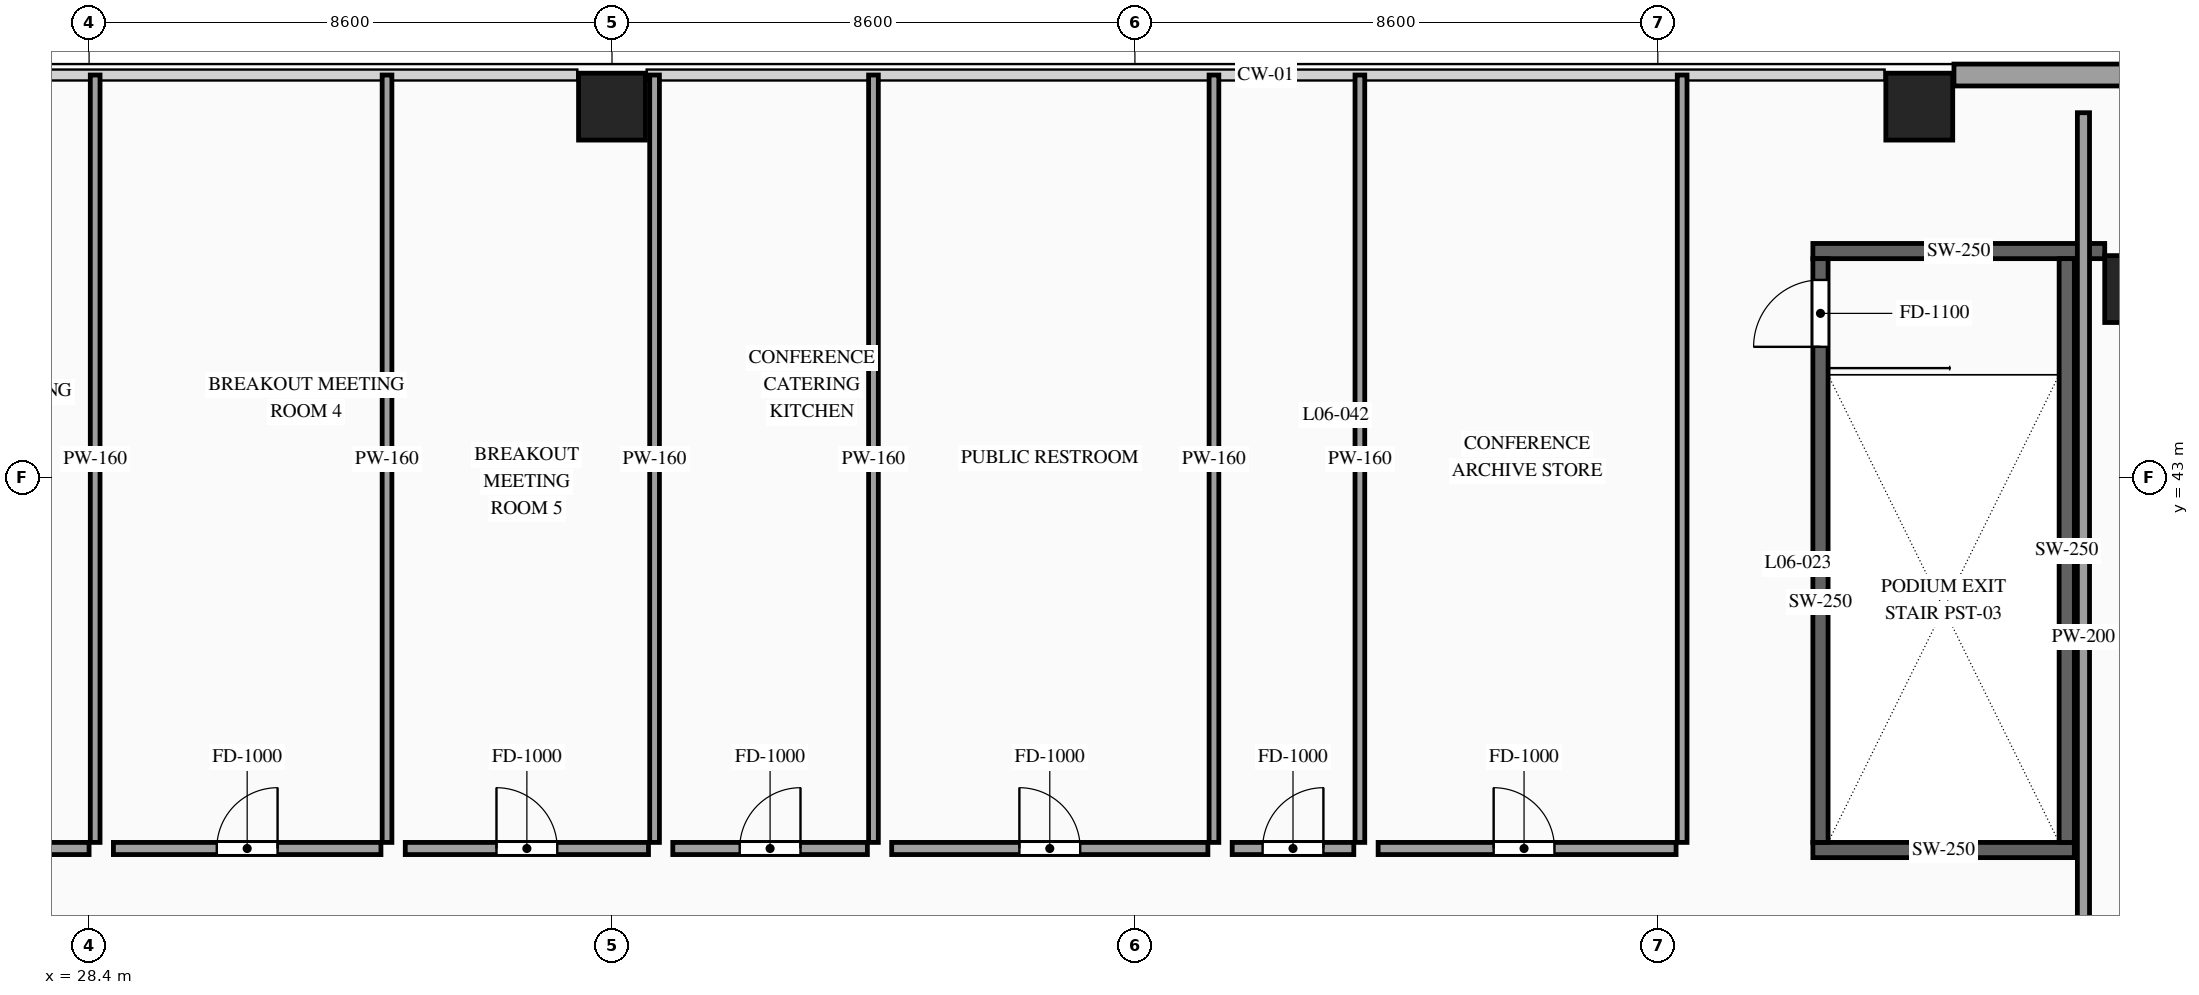
"""IFC4 building model, lengths in metres.
Left out: names, types, materials, properties, quantities, classifications, styles, units other than length and angle.
Written with IfcOpenShell. Run it as: python <this file> out.ifc"""

import sys

from ifc_helpers import new_model, si_unit, direction, frame, frame_2d, origin, origin_2d, place, context, subcontext, project, spatial, rectangle, extrude, source, transform, mapped, element, fill, save


model = new_model("IFC4")
c1 = context("Model", 3, precision=1e-05, world=origin(), true_north=direction((0.0, 1.0)))
c2 = subcontext(c1, "Body", "Model", "MODEL_VIEW")
j1 = project(units=[si_unit("LENGTHUNIT", "METRE"), si_unit("PLANEANGLEUNIT", "RADIAN")], contexts=[c1])
p1 = place(None, origin())
s1 = spatial("IfcSite", under=j1, at=p1, CompositionType="ELEMENT")
p2 = place(p1, origin())
s2 = spatial("IfcBuilding", under=s1, at=p2, CompositionType="ELEMENT")
p3 = place(p2, frame((0.0, 0.0, 25.8)))
s3 = spatial("IfcBuildingStorey", under=s2, at=p3, CompositionType="ELEMENT", Elevation=25.8)
m1 = source(origin(), c2, "Body", "SweptSolid", [
    extrude(rectangle(XDim=1.1, YDim=1.1, at=origin_2d()), origin(), (0.0, 0.0, 1.0), 4.8),
])
for number, where, z_axis, x_axis in (
    (1, (62.1, 46.1, 0.0), (0.0, 0.0, 1.0), (1.0, 0.0, 0.0)),
    (2, (37.0, 49.1, 0.0), (0.0, 0.0, 1.0), (1.0, 0.0, 0.0)),
    (3, (58.5, 49.1, 0.0), (0.0, 0.0, 1.0), (1.0, 0.0, 0.0)),
):
    element("IfcColumn", number, at=place(p3, frame(where, z_axis=z_axis, x_axis=x_axis)), inside=s3, PredefinedType="COLUMN", context=c2, shape_type="MappedRepresentation", body=[
        mapped(m1, transform((0.0, 0.0, 0.0), scale=1.0)),
    ])
p4 = place(p3, frame((59.07, 49.62, 0.0), z_axis=(0.0, 0.0, 1.0), x_axis=(1.0, 0.0, 0.0)))
e4 = element("IfcWall", 4, at=p4, inside=s3, PredefinedType="SOLIDWALL", context=c2, shape_type="SweptSolid", body=[
    extrude(rectangle(XDim=12.93, YDim=0.36, at=frame_2d((6.465, 0.0))), origin(), (0.0, 0.0, 1.0), 4.5),
])
p5 = place(p4, frame((6.03, 0.0, 0.9)))
e5 = element("IfcOpeningElement", 5, at=p5, cuts=e4, PredefinedType="OPENING", context=c2, shape_type="SweptSolid", body=[
    extrude(rectangle(XDim=1.8, YDim=2.2, at=frame_2d((0.9, 1.1))), frame((0.0, 0.195, 0.0), z_axis=(0.0, -1.0, 0.0), x_axis=(1.0, 0.0, 0.0)), (0.0, 0.0, 1.0), 0.39),
])
m2 = source(origin(), c2, "Body", "SweptSolid", [
    extrude(rectangle(XDim=4.3, YDim=0.25, at=frame_2d((2.15, 0.0))), origin(), (0.0, 0.0, 1.0), 4.5),
])
p6 = place(p3, frame((56.75, 36.875, 0.0), z_axis=(0.0, 0.0, 1.0), x_axis=(1.0, 0.0, 0.0)))
e6 = element("IfcWall", 6, at=p6, inside=s3, PredefinedType="SOLIDWALL", context=c2, shape_type="MappedRepresentation", body=[
    mapped(m2, transform((0.0, 0.0, 0.0), scale=1.0)),
])
m3 = source(origin(), c2, "Body", "SweptSolid", [
    extrude(rectangle(XDim=4.8, YDim=0.25, at=frame_2d((2.4, 0.0))), origin(), (0.0, 0.0, 1.0), 4.5),
])
p7 = place(p3, frame((56.75, 46.725, 0.0), z_axis=(0.0, 0.0, 1.0), x_axis=(1.0, 0.0, 0.0)))
e7 = element("IfcWall", 7, at=p7, inside=s3, PredefinedType="SOLIDWALL", context=c2, shape_type="MappedRepresentation", body=[
    mapped(m3, transform((0.0, 0.0, 0.0), scale=1.0)),
])
p8 = place(p3, frame((56.875, 37.0, 0.0), z_axis=(0.0, 0.0, 1.0), x_axis=(0.0, 1.0, 0.0)))
e8 = element("IfcWall", 8, at=p8, inside=s3, PredefinedType="SOLIDWALL", context=c2, shape_type="SweptSolid", body=[
    extrude(rectangle(XDim=9.6, YDim=0.25, at=frame_2d((4.8, 0.0))), origin(), (0.0, 0.0, 1.0), 4.5),
])
p9 = place(p8, frame((8.15, 0.0, 0.0)))
e9 = element("IfcOpeningElement", 9, at=p9, cuts=e8, PredefinedType="OPENING", context=c2, shape_type="SweptSolid", body=[
    extrude(rectangle(XDim=1.1, YDim=2.2, at=frame_2d((0.55, 1.1))), frame((0.0, 0.14, 0.0), z_axis=(0.0, -1.0, 0.0), x_axis=(1.0, 0.0, 0.0)), (0.0, 0.0, 1.0), 0.28),
])
m4 = source(origin(), c2, "Body", "SweptSolid", [
    extrude(rectangle(XDim=9.6, YDim=0.25, at=frame_2d((4.8, 0.0))), origin(), (0.0, 0.0, 1.0), 4.5),
])
p10 = place(p3, frame((60.925, 37.0, 0.0), z_axis=(0.0, 0.0, 1.0), x_axis=(0.0, 1.0, 0.0)))
e10 = element("IfcWall", 10, at=p10, inside=s3, PredefinedType="SOLIDWALL", context=c2, shape_type="MappedRepresentation", body=[
    mapped(m4, transform((0.0, 0.0, 0.0), scale=1.0)),
])
p11 = place(p3, frame((61.2, 24.8, 0.0), z_axis=(0.0, 0.0, 1.0), x_axis=(0.0, 1.0, 0.0)))
e11 = element("IfcWall", 11, at=p11, inside=s3, PredefinedType="PARTITIONING", context=c2, shape_type="SweptSolid", body=[
    extrude(rectangle(XDim=24.2, YDim=0.2, at=frame_2d((12.1, 0.0))), origin(), (0.0, 0.0, 1.0), 4.5),
])
p12 = place(p11, frame((5.7, 0.0, 0.0)))
e12 = element("IfcOpeningElement", 12, at=p12, cuts=e11, PredefinedType="OPENING", context=c2, shape_type="SweptSolid", body=[
    extrude(rectangle(XDim=1.0, YDim=2.2, at=frame_2d((0.5, 1.1))), frame((0.0, 0.115, 0.0), z_axis=(0.0, -1.0, 0.0), x_axis=(1.0, 0.0, 0.0)), (0.0, 0.0, 1.0), 0.23),
])
p13 = place(p3, frame((23.6, 36.9, 0.0), z_axis=(0.0, 0.0, 1.0), x_axis=(1.0, 0.0, 0.0)))
e13 = element("IfcWall", 13, at=p13, inside=s3, PredefinedType="PARTITIONING", context=c2, shape_type="SweptSolid", body=[
    extrude(rectangle(XDim=4.8, YDim=0.2, at=frame_2d((2.4, 0.0))), origin(), (0.0, 0.0, 1.0), 4.5),
])
p14 = place(p13, frame((1.9, 0.0, 0.0)))
e14 = element("IfcOpeningElement", 14, at=p14, cuts=e13, PredefinedType="OPENING", context=c2, shape_type="SweptSolid", body=[
    extrude(rectangle(XDim=1.0, YDim=2.2, at=frame_2d((0.5, 1.1))), frame((0.0, 0.115, 0.0), z_axis=(0.0, -1.0, 0.0), x_axis=(1.0, 0.0, 0.0)), (0.0, 0.0, 1.0), 0.23),
])
m5 = source(origin(), c2, "Body", "SweptSolid", [
    extrude(rectangle(XDim=12.62, YDim=0.16, at=frame_2d((6.31, 0.0))), origin(), (0.0, 0.0, 1.0), 4.5),
])
p15 = place(p3, frame((28.5, 37.0, 0.0), z_axis=(0.0, 0.0, 1.0), x_axis=(0.0, 1.0, 0.0)))
e15 = element("IfcWall", 15, at=p15, inside=s3, PredefinedType="PARTITIONING", context=c2, shape_type="MappedRepresentation", body=[
    mapped(m5, transform((0.0, 0.0, 0.0), scale=1.0)),
])
p16 = place(p3, frame((28.8, 36.9, 0.0), z_axis=(0.0, 0.0, 1.0), x_axis=(1.0, 0.0, 0.0)))
e16 = element("IfcWall", 16, at=p16, inside=s3, PredefinedType="PARTITIONING", context=c2, shape_type="SweptSolid", body=[
    extrude(rectangle(XDim=4.4, YDim=0.2, at=frame_2d((2.2, 0.0))), origin(), (0.0, 0.0, 1.0), 4.5),
])
p17 = place(p16, frame((1.7, 0.0, 0.0)))
e17 = element("IfcOpeningElement", 17, at=p17, cuts=e16, PredefinedType="OPENING", context=c2, shape_type="SweptSolid", body=[
    extrude(rectangle(XDim=1.0, YDim=2.2, at=frame_2d((0.5, 1.1))), frame((0.0, 0.115, 0.0), z_axis=(0.0, -1.0, 0.0), x_axis=(1.0, 0.0, 0.0)), (0.0, 0.0, 1.0), 0.23),
])
p18 = place(p3, frame((33.3, 37.0, 0.0), z_axis=(0.0, 0.0, 1.0), x_axis=(0.0, 1.0, 0.0)))
e18 = element("IfcWall", 18, at=p18, inside=s3, PredefinedType="PARTITIONING", context=c2, shape_type="MappedRepresentation", body=[
    mapped(m5, transform((0.0, 0.0, 0.0), scale=1.0)),
])
p19 = place(p3, frame((33.6, 36.9, 0.0), z_axis=(0.0, 0.0, 1.0), x_axis=(1.0, 0.0, 0.0)))
e19 = element("IfcWall", 19, at=p19, inside=s3, PredefinedType="PARTITIONING", context=c2, shape_type="SweptSolid", body=[
    extrude(rectangle(XDim=4.0, YDim=0.2, at=frame_2d((2.0, 0.0))), origin(), (0.0, 0.0, 1.0), 4.5),
])
p20 = place(p19, frame((1.5, 0.0, 0.0)))
e20 = element("IfcOpeningElement", 20, at=p20, cuts=e19, PredefinedType="OPENING", context=c2, shape_type="SweptSolid", body=[
    extrude(rectangle(XDim=1.0, YDim=2.2, at=frame_2d((0.5, 1.1))), frame((0.0, 0.115, 0.0), z_axis=(0.0, -1.0, 0.0), x_axis=(1.0, 0.0, 0.0)), (0.0, 0.0, 1.0), 0.23),
])
p21 = place(p3, frame((37.7, 37.0, 0.0), z_axis=(0.0, 0.0, 1.0), x_axis=(0.0, 1.0, 0.0)))
e21 = element("IfcWall", 21, at=p21, inside=s3, PredefinedType="PARTITIONING", context=c2, shape_type="MappedRepresentation", body=[
    mapped(m5, transform((0.0, 0.0, 0.0), scale=1.0)),
])
p22 = place(p3, frame((38.0, 36.9, 0.0), z_axis=(0.0, 0.0, 1.0), x_axis=(1.0, 0.0, 0.0)))
e22 = element("IfcWall", 22, at=p22, inside=s3, PredefinedType="PARTITIONING", context=c2, shape_type="SweptSolid", body=[
    extrude(rectangle(XDim=3.2, YDim=0.2, at=frame_2d((1.6, 0.0))), origin(), (0.0, 0.0, 1.0), 4.5),
])
p23 = place(p22, frame((1.1, 0.0, 0.0)))
e23 = element("IfcOpeningElement", 23, at=p23, cuts=e22, PredefinedType="OPENING", context=c2, shape_type="SweptSolid", body=[
    extrude(rectangle(XDim=1.0, YDim=2.2, at=frame_2d((0.5, 1.1))), frame((0.0, 0.115, 0.0), z_axis=(0.0, -1.0, 0.0), x_axis=(1.0, 0.0, 0.0)), (0.0, 0.0, 1.0), 0.23),
])
p24 = place(p3, frame((41.3, 37.0, 0.0), z_axis=(0.0, 0.0, 1.0), x_axis=(0.0, 1.0, 0.0)))
e24 = element("IfcWall", 24, at=p24, inside=s3, PredefinedType="PARTITIONING", context=c2, shape_type="MappedRepresentation", body=[
    mapped(m5, transform((0.0, 0.0, 0.0), scale=1.0)),
])
p25 = place(p3, frame((41.6, 36.9, 0.0), z_axis=(0.0, 0.0, 1.0), x_axis=(1.0, 0.0, 0.0)))
e25 = element("IfcWall", 25, at=p25, inside=s3, PredefinedType="PARTITIONING", context=c2, shape_type="SweptSolid", body=[
    extrude(rectangle(XDim=5.2, YDim=0.2, at=frame_2d((2.6, 0.0))), origin(), (0.0, 0.0, 1.0), 4.5),
])
p26 = place(p25, frame((2.1, 0.0, 0.0)))
e26 = element("IfcOpeningElement", 26, at=p26, cuts=e25, PredefinedType="OPENING", context=c2, shape_type="SweptSolid", body=[
    extrude(rectangle(XDim=1.0, YDim=2.2, at=frame_2d((0.5, 1.1))), frame((0.0, 0.115, 0.0), z_axis=(0.0, -1.0, 0.0), x_axis=(1.0, 0.0, 0.0)), (0.0, 0.0, 1.0), 0.23),
])
p27 = place(p3, frame((46.9, 37.0, 0.0), z_axis=(0.0, 0.0, 1.0), x_axis=(0.0, 1.0, 0.0)))
e27 = element("IfcWall", 27, at=p27, inside=s3, PredefinedType="PARTITIONING", context=c2, shape_type="MappedRepresentation", body=[
    mapped(m5, transform((0.0, 0.0, 0.0), scale=1.0)),
])
p28 = place(p3, frame((47.2, 36.9, 0.0), z_axis=(0.0, 0.0, 1.0), x_axis=(1.0, 0.0, 0.0)))
e28 = element("IfcWall", 28, at=p28, inside=s3, PredefinedType="PARTITIONING", context=c2, shape_type="SweptSolid", body=[
    extrude(rectangle(XDim=2.0, YDim=0.2, at=frame_2d((1.0, 0.0))), origin(), (0.0, 0.0, 1.0), 4.5),
])
p29 = place(p28, frame((0.5, 0.0, 0.0)))
e29 = element("IfcOpeningElement", 29, at=p29, cuts=e28, PredefinedType="OPENING", context=c2, shape_type="SweptSolid", body=[
    extrude(rectangle(XDim=1.0, YDim=2.2, at=frame_2d((0.5, 1.1))), frame((0.0, 0.115, 0.0), z_axis=(0.0, -1.0, 0.0), x_axis=(1.0, 0.0, 0.0)), (0.0, 0.0, 1.0), 0.23),
])
p30 = place(p3, frame((49.3, 37.0, 0.0), z_axis=(0.0, 0.0, 1.0), x_axis=(0.0, 1.0, 0.0)))
e30 = element("IfcWall", 30, at=p30, inside=s3, PredefinedType="PARTITIONING", context=c2, shape_type="MappedRepresentation", body=[
    mapped(m5, transform((0.0, 0.0, 0.0), scale=1.0)),
])
p31 = place(p3, frame((49.6, 36.9, 0.0), z_axis=(0.0, 0.0, 1.0), x_axis=(1.0, 0.0, 0.0)))
e31 = element("IfcWall", 31, at=p31, inside=s3, PredefinedType="PARTITIONING", context=c2, shape_type="SweptSolid", body=[
    extrude(rectangle(XDim=4.9, YDim=0.2, at=frame_2d((2.45, 0.0))), origin(), (0.0, 0.0, 1.0), 4.5),
])
p32 = place(p31, frame((1.9, 0.0, 0.0)))
e32 = element("IfcOpeningElement", 32, at=p32, cuts=e31, PredefinedType="OPENING", context=c2, shape_type="SweptSolid", body=[
    extrude(rectangle(XDim=1.0, YDim=2.2, at=frame_2d((0.5, 1.1))), frame((0.0, 0.115, 0.0), z_axis=(0.0, -1.0, 0.0), x_axis=(1.0, 0.0, 0.0)), (0.0, 0.0, 1.0), 0.23),
])
p33 = place(p3, frame((54.6, 37.0, 0.0), z_axis=(0.0, 0.0, 1.0), x_axis=(0.0, 1.0, 0.0)))
e33 = element("IfcWall", 33, at=p33, inside=s3, PredefinedType="PARTITIONING", context=c2, shape_type="MappedRepresentation", body=[
    mapped(m5, transform((0.0, 0.0, 0.0), scale=1.0)),
])
m6 = source(origin(), c2, "Body", "SweptSolid", [
    extrude(rectangle(XDim=1.1, YDim=2.2, at=frame_2d((0.55, 1.1))), frame((0.0, 0.025, 0.0), z_axis=(0.0, -1.0, 0.0), x_axis=(1.0, 0.0, 0.0)), (0.0, 0.0, 1.0), 0.05),
])
p34 = place(p9, origin())
e34 = element("IfcDoor", 34, at=p34, inside=s3, OperationType="SINGLE_SWING_LEFT", PredefinedType="DOOR", context=c2, shape_type="MappedRepresentation", body=[
    mapped(m6, transform((0.0, 0.0, 0.0), scale=1.0)),
])
fill(e9, e34)
m7 = source(origin(), c2, "Body", "SweptSolid", [
    extrude(rectangle(XDim=1.0, YDim=2.2, at=frame_2d((0.5, 1.1))), frame((0.0, 0.025, 0.0), z_axis=(0.0, -1.0, 0.0), x_axis=(1.0, 0.0, 0.0)), (0.0, 0.0, 1.0), 0.05),
])
p35 = place(p17, origin())
e35 = element("IfcDoor", 35, at=p35, inside=s3, OperationType="SINGLE_SWING_RIGHT", PredefinedType="DOOR", context=c2, shape_type="MappedRepresentation", body=[
    mapped(m7, transform((0.0, 0.0, 0.0), scale=1.0)),
])
fill(e17, e35)
p36 = place(p20, origin())
e36 = element("IfcDoor", 36, at=p36, inside=s3, OperationType="SINGLE_SWING_LEFT", PredefinedType="DOOR", context=c2, shape_type="MappedRepresentation", body=[
    mapped(m7, transform((0.0, 0.0, 0.0), scale=1.0)),
])
fill(e20, e36)
p37 = place(p23, origin())
e37 = element("IfcDoor", 37, at=p37, inside=s3, OperationType="SINGLE_SWING_RIGHT", PredefinedType="DOOR", context=c2, shape_type="MappedRepresentation", body=[
    mapped(m7, transform((0.0, 0.0, 0.0), scale=1.0)),
])
fill(e23, e37)
p38 = place(p26, origin())
e38 = element("IfcDoor", 38, at=p38, inside=s3, OperationType="SINGLE_SWING_LEFT", PredefinedType="DOOR", context=c2, shape_type="MappedRepresentation", body=[
    mapped(m7, transform((0.0, 0.0, 0.0), scale=1.0)),
])
fill(e26, e38)
p39 = place(p29, origin())
e39 = element("IfcDoor", 39, at=p39, inside=s3, OperationType="SINGLE_SWING_RIGHT", PredefinedType="DOOR", context=c2, shape_type="MappedRepresentation", body=[
    mapped(m7, transform((0.0, 0.0, 0.0), scale=1.0)),
])
fill(e29, e39)
p40 = place(p32, origin())
e40 = element("IfcDoor", 40, at=p40, inside=s3, OperationType="SINGLE_SWING_LEFT", PredefinedType="DOOR", context=c2, shape_type="MappedRepresentation", body=[
    mapped(m7, transform((0.0, 0.0, 0.0), scale=1.0)),
])
fill(e32, e40)
save(model, sys.argv[1])
